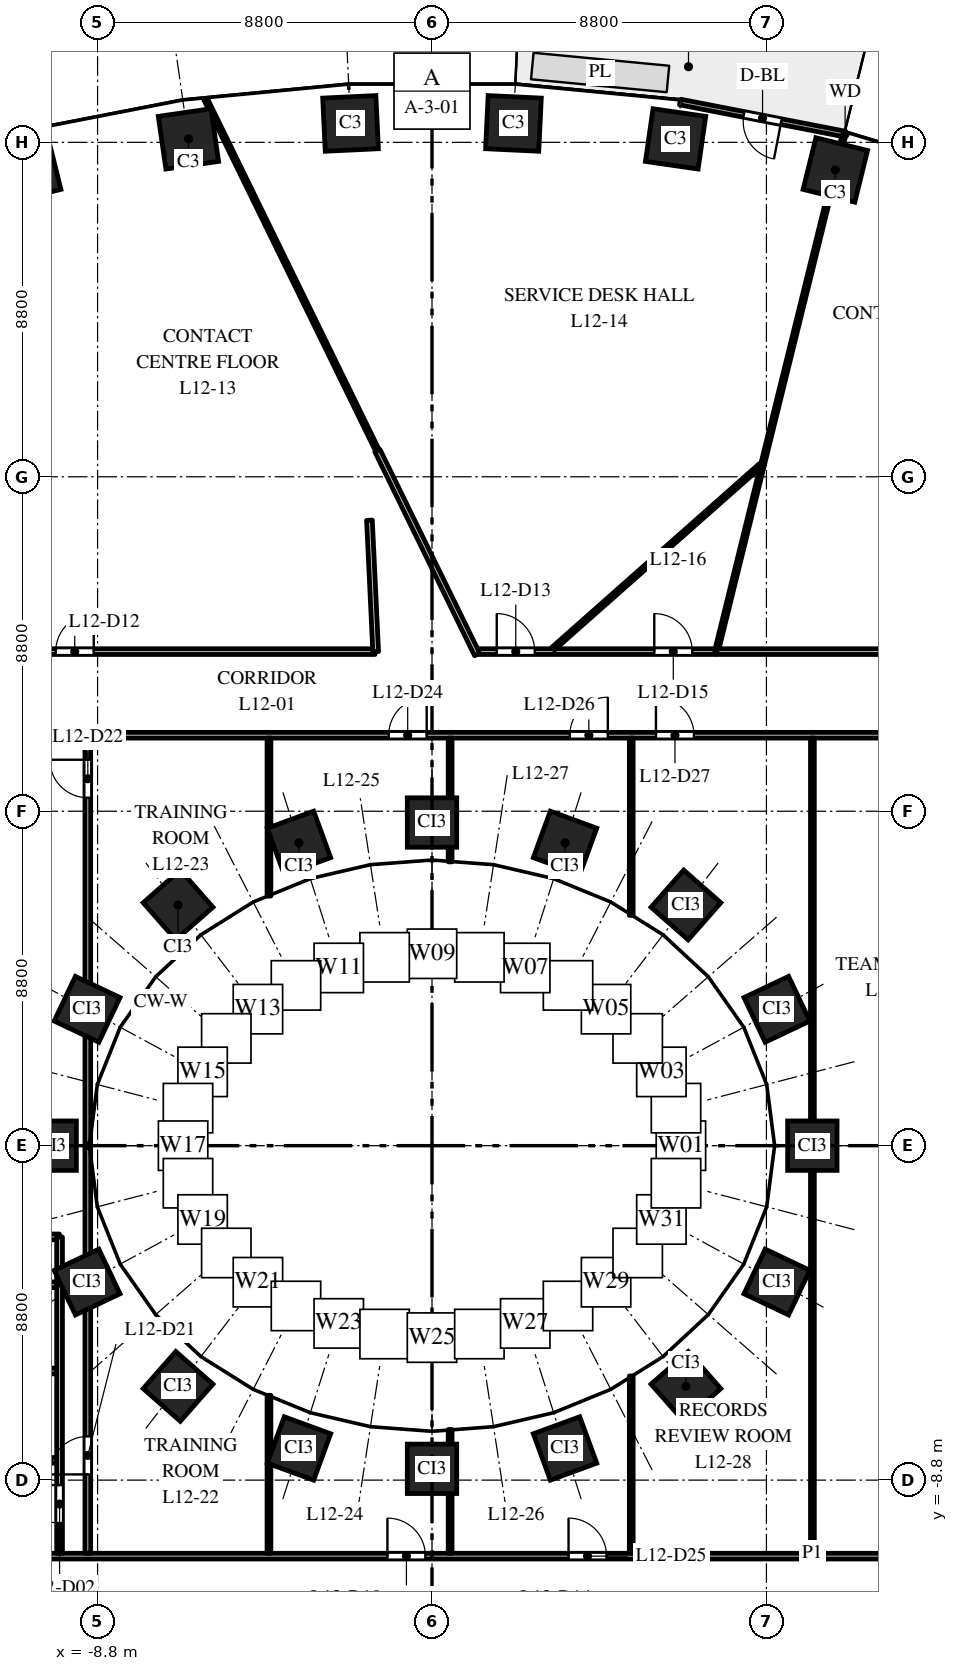
"""IFC4 building model, lengths in metres.
Left out: names, types, materials, properties, quantities, classifications, styles, units other than length and angle.
Written with IfcOpenShell. Run it as: python <this file> out.ifc"""

import sys

from ifc_helpers import new_model, si_unit, direction, frame, frame_2d, origin, origin_2d, place, context, subcontext, project, spatial, rectangle, extrude, element, fill, save


model = new_model("IFC4")
c1 = context("Model", 3, precision=1e-05, world=origin(), true_north=direction((0.0, 1.0)))
c2 = subcontext(c1, "Body", "Model", "MODEL_VIEW")
j1 = project(units=[si_unit("LENGTHUNIT", "METRE"), si_unit("PLANEANGLEUNIT", "RADIAN")], contexts=[c1])
p1 = place(None, origin())
s1 = spatial("IfcSite", under=j1, at=p1, CompositionType="ELEMENT")
p2 = place(p1, origin())
s2 = spatial("IfcBuilding", under=s1, at=p2, CompositionType="ELEMENT")
p3 = place(p2, frame((0.0, 0.0, 58.5)))
s3 = spatial("IfcBuildingStorey", under=s2, at=p3, CompositionType="ELEMENT", Elevation=58.5)
for number, where, z_axis, x_axis in (
    (1, (10.613, 25.674, 0.0), (0.0, 0.0, 1.0), (-0.971, 0.24, 0.0)),
    (2, (6.409, 26.491, 0.0), (0.0, 0.0, 1.0), (-0.99, 0.143, 0.0)),
    (3, (2.143, 26.898, 0.0), (0.0, 0.0, 1.0), (-0.999, 0.048, 0.0)),
    (4, (-2.143, 26.898, 0.0), (0.0, 0.0, 1.0), (-0.999, -0.048, 0.0)),
    (5, (-6.409, 26.491, 0.0), (0.0, 0.0, 1.0), (-0.99, -0.143, 0.0)),
    (6, (-10.613, 25.674, 0.0), (0.0, 0.0, 1.0), (-0.971, -0.24, 0.0)),
):
    element("IfcColumn", number, at=place(p3, frame(where, z_axis=z_axis, x_axis=x_axis)), inside=s3, PredefinedType="COLUMN", context=c2, shape_type="SweptSolid", body=[
        extrude(rectangle(XDim=1.4, YDim=1.4, at=origin_2d()), origin(), (0.0, 0.0, 1.0), 4.0),
    ])
for number, where, z_axis, x_axis in (
    (7, (10.008, 0.0, 0.0), (0.0, 0.0, 1.0), (0.0, 1.0, 0.0)),
    (8, (9.076, 3.588, 0.0), (0.0, 0.0, 1.0), (-0.429, 0.903, 0.0)),
    (9, (6.682, 6.334, 0.0), (0.0, 0.0, 1.0), (-0.751, 0.66, 0.0)),
    (10, (3.501, 7.967, 0.0), (0.0, 0.0, 1.0), (-0.939, 0.344, 0.0)),
    (11, (0.0, 8.503, 0.0), (0.0, 0.0, 1.0), (-1.0, 0.0, 0.0)),
    (12, (-3.501, 7.967, 0.0), (0.0, 0.0, 1.0), (-0.939, -0.344, 0.0)),
    (13, (-6.682, 6.334, 0.0), (0.0, 0.0, 1.0), (-0.751, -0.66, 0.0)),
    (14, (-9.076, 3.588, 0.0), (0.0, 0.0, 1.0), (-0.429, -0.903, 0.0)),
    (15, (-10.008, 0.0, 0.0), (0.0, 0.0, 1.0), (0.0, -1.0, 0.0)),
    (16, (-9.076, -3.588, 0.0), (0.0, 0.0, 1.0), (0.429, -0.903, 0.0)),
    (17, (-6.682, -6.334, 0.0), (0.0, 0.0, 1.0), (0.751, -0.66, 0.0)),
    (18, (-3.501, -7.967, 0.0), (0.0, 0.0, 1.0), (0.939, -0.344, 0.0)),
    (19, (0.0, -8.503, 0.0), (0.0, 0.0, 1.0), (1.0, 0.0, 0.0)),
    (20, (3.501, -7.967, 0.0), (0.0, 0.0, 1.0), (0.939, 0.344, 0.0)),
    (21, (6.682, -6.334, 0.0), (0.0, 0.0, 1.0), (0.751, 0.66, 0.0)),
    (22, (9.076, -3.588, 0.0), (0.0, 0.0, 1.0), (0.429, 0.903, 0.0)),
):
    element("IfcColumn", number, at=place(p3, frame(where, z_axis=z_axis, x_axis=x_axis)), inside=s3, PredefinedType="COLUMN", context=c2, shape_type="SweptSolid", body=[
        extrude(rectangle(XDim=1.3, YDim=1.3, at=origin_2d()), origin(), (0.0, 0.0, 1.0), 4.0),
    ])
p4 = place(p3, frame((10.871, 26.617, 0.0), z_axis=(0.0, 0.0, 1.0), x_axis=(-0.981631174778, 0.190788460615, 0.0)))
e23 = element("IfcWall", 23, at=p4, inside=s3, PredefinedType="STANDARD", context=c2, shape_type="SweptSolid", body=[
    extrude(rectangle(XDim=4.426, YDim=0.15, at=frame_2d((2.213, 0.0))), origin(), (0.0, 0.0, 1.0), 3.7),
])
p5 = place(p4, frame((1.713, 0.0, 0.0)))
e24 = element("IfcOpeningElement", 24, at=p5, cuts=e23, PredefinedType="OPENING", context=c2, shape_type="SweptSolid", body=[
    extrude(rectangle(XDim=1.0, YDim=2.4, at=frame_2d((0.5, 1.2))), frame((0.0, 0.085, 0.0), z_axis=(0.0, -1.0, 0.0), x_axis=(1.0, 0.0, 0.0)), (0.0, 0.0, 1.0), 0.17),
])
p6 = place(p3, frame((-14.3, -10.8, 0.0), z_axis=(0.0, 0.0, 1.0), x_axis=(1.0, 0.0, 0.0)))
e25 = element("IfcWall", 25, at=p6, inside=s3, PredefinedType="PARTITIONING", context=c2, shape_type="SweptSolid", body=[
    extrude(rectangle(XDim=28.6, YDim=0.15, at=frame_2d((14.3, 0.0))), origin(), (0.0, 0.0, 1.0), 2.85),
])
p7 = place(p6, frame((13.127, 0.0, 0.0)))
e26 = element("IfcOpeningElement", 26, at=p7, cuts=e25, PredefinedType="OPENING", context=c2, shape_type="SweptSolid", body=[
    extrude(rectangle(XDim=1.0, YDim=2.1, at=frame_2d((0.5, 1.05))), frame((0.0, 0.085, 0.0), z_axis=(0.0, -1.0, 0.0), x_axis=(1.0, 0.0, 0.0)), (0.0, 0.0, 1.0), 0.17),
])
p8 = place(p6, frame((17.893, 0.0, 0.0)))
e27 = element("IfcOpeningElement", 27, at=p8, cuts=e25, PredefinedType="OPENING", context=c2, shape_type="SweptSolid", body=[
    extrude(rectangle(XDim=1.0, YDim=2.1, at=frame_2d((0.5, 1.05))), frame((0.0, 0.085, 0.0), z_axis=(0.0, -1.0, 0.0), x_axis=(1.0, 0.0, 0.0)), (0.0, 0.0, 1.0), 0.17),
])
p9 = place(p3, frame((-14.3, 10.8, 0.0), z_axis=(0.0, 0.0, 1.0), x_axis=(1.0, 0.0, 0.0)))
e28 = element("IfcWall", 28, at=p9, inside=s3, PredefinedType="PARTITIONING", context=c2, shape_type="SweptSolid", body=[
    extrude(rectangle(XDim=28.6, YDim=0.15, at=frame_2d((14.3, 0.0))), origin(), (0.0, 0.0, 1.0), 2.85),
])
p10 = place(p9, frame((13.16, 0.0, 0.0)))
e29 = element("IfcOpeningElement", 29, at=p10, cuts=e28, PredefinedType="OPENING", context=c2, shape_type="SweptSolid", body=[
    extrude(rectangle(XDim=1.0, YDim=2.1, at=frame_2d((0.5, 1.05))), frame((0.0, 0.085, 0.0), z_axis=(0.0, -1.0, 0.0), x_axis=(1.0, 0.0, 0.0)), (0.0, 0.0, 1.0), 0.17),
])
p11 = place(p9, frame((17.927, 0.0, 0.0)))
e30 = element("IfcOpeningElement", 30, at=p11, cuts=e28, PredefinedType="OPENING", context=c2, shape_type="SweptSolid", body=[
    extrude(rectangle(XDim=1.0, YDim=2.1, at=frame_2d((0.5, 1.05))), frame((0.0, 0.085, 0.0), z_axis=(0.0, -1.0, 0.0), x_axis=(1.0, 0.0, 0.0)), (0.0, 0.0, 1.0), 0.17),
])
p12 = place(p9, frame((20.193, 0.0, 0.0)))
e31 = element("IfcOpeningElement", 31, at=p12, cuts=e28, PredefinedType="OPENING", context=c2, shape_type="SweptSolid", body=[
    extrude(rectangle(XDim=1.0, YDim=2.1, at=frame_2d((0.5, 1.05))), frame((0.0, 0.085, 0.0), z_axis=(0.0, -1.0, 0.0), x_axis=(1.0, 0.0, 0.0)), (0.0, 0.0, 1.0), 0.17),
])
p13 = place(p3, frame((-12.325, -8.28, 0.0), z_axis=(0.0, 0.0, 1.0), x_axis=(1.0, 0.0, 0.0)))
e32 = element("IfcWall", 32, at=p13, inside=s3, PredefinedType="PARTITIONING", context=c2, shape_type="SweptSolid", body=[
    extrude(rectangle(XDim=2.45, YDim=0.15, at=frame_2d((1.225, 0.0))), origin(), (0.0, 0.0, 1.0), 2.75),
])
p14 = place(p3, frame((-12.325, -5.928, 0.0), z_axis=(0.0, 0.0, 1.0), x_axis=(1.0, 0.0, 0.0)))
e33 = element("IfcWall", 33, at=p14, inside=s3, PredefinedType="PARTITIONING", context=c2, shape_type="SweptSolid", body=[
    extrude(rectangle(XDim=2.45, YDim=0.15, at=frame_2d((1.225, 0.0))), origin(), (0.0, 0.0, 1.0), 3.7),
])
p15 = place(p3, frame((-12.4, -3.66, 0.0), z_axis=(0.0, 0.0, 1.0), x_axis=(1.0, 0.0, 0.0)))
e34 = element("IfcWall", 34, at=p15, inside=s3, PredefinedType="PARTITIONING", context=c2, shape_type="SweptSolid", body=[
    extrude(rectangle(XDim=2.6, YDim=0.15, at=frame_2d((1.3, 0.0))), origin(), (0.0, 0.0, 1.0), 3.7),
])
p16 = place(p3, frame((-12.4, -2.4, 0.0), z_axis=(0.0, 0.0, 1.0), x_axis=(1.0, 0.0, 0.0)))
e35 = element("IfcWall", 35, at=p16, inside=s3, PredefinedType="PARTITIONING", context=c2, shape_type="SweptSolid", body=[
    extrude(rectangle(XDim=2.596, YDim=0.15, at=frame_2d((1.298, 0.0))), origin(), (0.0, 0.0, 1.0), 3.7),
])
p17 = place(p3, frame((-10.542, 13.0, 0.0), z_axis=(0.0, 0.0, 1.0), x_axis=(1.0, 0.0, 0.0)))
e36 = element("IfcWall", 36, at=p17, inside=s3, PredefinedType="PARTITIONING", context=c2, shape_type="SweptSolid", body=[
    extrude(rectangle(XDim=9.041, YDim=0.15, at=frame_2d((4.521, 0.0))), origin(), (0.0, 0.0, 1.0), 2.85),
])
p18 = place(p17, frame((0.641, 0.0, 0.0)))
e37 = element("IfcOpeningElement", 37, at=p18, cuts=e36, PredefinedType="OPENING", context=c2, shape_type="SweptSolid", body=[
    extrude(rectangle(XDim=1.0, YDim=2.1, at=frame_2d((0.5, 1.05))), frame((0.0, 0.085, 0.0), z_axis=(0.0, -1.0, 0.0), x_axis=(1.0, 0.0, 0.0)), (0.0, 0.0, 1.0), 0.17),
])
p19 = place(p3, frame((-9.8, -10.725, 0.0), z_axis=(0.0, 0.0, 1.0), x_axis=(0.0, 1.0, 0.0)))
e38 = element("IfcWall", 38, at=p19, inside=s3, PredefinedType="PARTITIONING", context=c2, shape_type="SweptSolid", body=[
    extrude(rectangle(XDim=7.065, YDim=0.15, at=frame_2d((3.533, 0.0))), origin(), (0.0, 0.0, 1.0), 2.75),
])
p20 = place(p19, frame((0.795, 0.0, 0.0)))
e39 = element("IfcOpeningElement", 39, at=p20, cuts=e38, PredefinedType="OPENING", context=c2, shape_type="SweptSolid", body=[
    extrude(rectangle(XDim=1.0, YDim=2.1, at=frame_2d((0.5, 1.05))), frame((0.0, 0.085, 0.0), z_axis=(0.0, -1.0, 0.0), x_axis=(1.0, 0.0, 0.0)), (0.0, 0.0, 1.0), 0.17),
])
p21 = place(p3, frame((-9.8, -3.66, 0.0), z_axis=(0.0, 0.0, 1.0), x_axis=(0.0, 1.0, 0.0)))
e40 = element("IfcWall", 40, at=p21, inside=s3, PredefinedType="PARTITIONING", context=c2, shape_type="SweptSolid", body=[
    extrude(rectangle(XDim=1.256, YDim=0.15, at=frame_2d((0.628, 0.0))), origin(), (0.0, 0.0, 1.0), 3.7),
])
p22 = place(p3, frame((-9.057, -10.725, 0.0), z_axis=(0.0, 0.0, 1.0), x_axis=(0.0, 1.0, 0.0)))
e41 = element("IfcWall", 41, at=p22, inside=s3, PredefinedType="PARTITIONING", context=c2, shape_type="SweptSolid", body=[
    extrude(rectangle(XDim=10.68, YDim=0.15, at=frame_2d((5.34, 0.0))), origin(), (0.0, 0.0, 1.0), 2.75),
])
p23 = place(p22, frame((2.075, 0.0, 0.0)))
e42 = element("IfcOpeningElement", 42, at=p23, cuts=e41, PredefinedType="OPENING", context=c2, shape_type="SweptSolid", body=[
    extrude(rectangle(XDim=1.0, YDim=2.1, at=frame_2d((0.5, 1.05))), frame((0.0, 0.085, 0.0), z_axis=(0.0, -1.0, 0.0), x_axis=(1.0, 0.0, 0.0)), (0.0, 0.0, 1.0), 0.17),
])
p24 = place(p3, frame((-9.057, 0.045, 0.0), z_axis=(0.0, 0.0, 1.0), x_axis=(0.0, 1.0, 0.0)))
e43 = element("IfcWall", 43, at=p24, inside=s3, PredefinedType="PARTITIONING", context=c2, shape_type="SweptSolid", body=[
    extrude(rectangle(XDim=10.68, YDim=0.15, at=frame_2d((5.34, 0.0))), origin(), (0.0, 0.0, 1.0), 2.75),
])
p25 = place(p24, frame((9.11, 0.0, 0.0)))
e44 = element("IfcOpeningElement", 44, at=p25, cuts=e43, PredefinedType="OPENING", context=c2, shape_type="SweptSolid", body=[
    extrude(rectangle(XDim=1.0, YDim=2.1, at=frame_2d((0.5, 1.05))), frame((0.0, 0.085, 0.0), z_axis=(0.0, -1.0, 0.0), x_axis=(1.0, 0.0, 0.0)), (0.0, 0.0, 1.0), 0.17),
])
p26 = place(p3, frame((-5.958, 27.538, 0.0), z_axis=(0.0, 0.0, 1.0), x_axis=(0.439258205704, -0.898360856628, 0.0)))
e45 = element("IfcWall", 45, at=p26, inside=s3, PredefinedType="PARTITIONING", context=c2, shape_type="SweptSolid", body=[
    extrude(rectangle(XDim=10.384, YDim=0.1, at=frame_2d((5.192, 0.0))), origin(), (0.0, 0.0, 1.0), 2.85),
])
for number, where, z_axis, x_axis in (
    (46, (-4.29, -10.725, 0.0), (0.0, 0.0, 1.0), (0.0, 1.0, 0.0)),
    (47, (-4.29, 6.568, 0.0), (0.0, 0.0, 1.0), (0.0, 1.0, 0.0)),
):
    element("IfcWall", number, at=place(p3, frame(where, z_axis=z_axis, x_axis=x_axis)), inside=s3, PredefinedType="PARTITIONING", context=c2, shape_type="SweptSolid", body=[
        extrude(rectangle(XDim=4.157, YDim=0.1, at=frame_2d((2.079, 0.0))), origin(), (0.0, 0.0, 1.0), 2.85),
    ])
p27 = place(p3, frame((-1.646, 16.456, 0.0), z_axis=(0.0, 0.0, 1.0), x_axis=(0.047417639272, -0.9988751511, 0.0)))
e48 = element("IfcWall", 48, at=p27, inside=s3, PredefinedType="PARTITIONING", context=c2, shape_type="SweptSolid", body=[
    extrude(rectangle(XDim=3.46, YDim=0.15, at=frame_2d((1.73, 0.0))), origin(), (0.0, 0.0, 1.0), 3.7),
])
p28 = place(p3, frame((-1.437, 18.29, 0.0), z_axis=(0.0, 0.0, 1.0), x_axis=(0.439496028197, -0.898244533075, 0.0)))
e49 = element("IfcWall", 49, at=p28, inside=s3, PredefinedType="PARTITIONING", context=c2, shape_type="SweptSolid", body=[
    extrude(rectangle(XDim=5.973, YDim=0.15, at=frame_2d((2.986, 0.0))), origin(), (0.0, 0.0, 1.0), 2.85),
])
for number, where, z_axis, x_axis in (
    (50, (0.477, -10.725, 0.0), (0.0, 0.0, 1.0), (0.0, 1.0, 0.0)),
    (51, (0.477, 7.468, 0.0), (0.0, 0.0, 1.0), (0.0, 1.0, 0.0)),
):
    element("IfcWall", number, at=place(p3, frame(where, z_axis=z_axis, x_axis=x_axis)), inside=s3, PredefinedType="PARTITIONING", context=c2, shape_type="SweptSolid", body=[
        extrude(rectangle(XDim=3.257, YDim=0.1, at=frame_2d((1.628, 0.0))), origin(), (0.0, 0.0, 1.0), 2.85),
    ])
p29 = place(p3, frame((1.233, 13.0, 0.0), z_axis=(0.0, 0.0, 1.0), x_axis=(1.0, 0.0, 0.0)))
e52 = element("IfcWall", 52, at=p29, inside=s3, PredefinedType="PARTITIONING", context=c2, shape_type="SweptSolid", body=[
    extrude(rectangle(XDim=6.25, YDim=0.15, at=frame_2d((3.125, 0.0))), origin(), (0.0, 0.0, 1.0), 2.85),
])
p30 = place(p29, frame((0.471, 0.0, 0.0)))
e53 = element("IfcOpeningElement", 53, at=p30, cuts=e52, PredefinedType="OPENING", context=c2, shape_type="SweptSolid", body=[
    extrude(rectangle(XDim=1.0, YDim=2.1, at=frame_2d((0.5, 1.05))), frame((0.0, 0.085, 0.0), z_axis=(0.0, -1.0, 0.0), x_axis=(1.0, 0.0, 0.0)), (0.0, 0.0, 1.0), 0.17),
])
p31 = place(p29, frame((4.616, 0.0, 0.0)))
e54 = element("IfcOpeningElement", 54, at=p31, cuts=e52, PredefinedType="OPENING", context=c2, shape_type="SweptSolid", body=[
    extrude(rectangle(XDim=1.0, YDim=2.1, at=frame_2d((0.5, 1.05))), frame((0.0, 0.085, 0.0), z_axis=(0.0, -1.0, 0.0), x_axis=(1.0, 0.0, 0.0)), (0.0, 0.0, 1.0), 0.17),
])
p32 = place(p3, frame((3.187, 13.078, 0.0), z_axis=(0.0, 0.0, 1.0), x_axis=(0.749027274438, 0.662539162728, 0.0)))
e55 = element("IfcWall", 55, at=p32, inside=s3, PredefinedType="PARTITIONING", context=c2, shape_type="SweptSolid", body=[
    extrude(rectangle(XDim=7.283, YDim=0.1, at=frame_2d((3.642, 0.0))), origin(), (0.0, 0.0, 1.0), 2.85),
])
for number, where, z_axis, x_axis in (
    (56, (5.243, -10.725, 0.0), (0.0, 0.0, 1.0), (0.0, 1.0, 0.0)),
    (57, (5.243, 6.059, 0.0), (0.0, 0.0, 1.0), (0.0, 1.0, 0.0)),
):
    element("IfcWall", number, at=place(p3, frame(where, z_axis=z_axis, x_axis=x_axis)), inside=s3, PredefinedType="PARTITIONING", context=c2, shape_type="SweptSolid", body=[
        extrude(rectangle(XDim=4.666, YDim=0.1, at=frame_2d((2.333, 0.0))), origin(), (0.0, 0.0, 1.0), 2.85),
    ])
p33 = place(p3, frame((7.483, 13.0, 0.0), z_axis=(0.0, 0.0, 1.0), x_axis=(0.239763745499, 0.97083126564, 0.0)))
e58 = element("IfcWall", 58, at=p33, inside=s3, PredefinedType="PARTITIONING", context=c2, shape_type="SweptSolid", body=[
    extrude(rectangle(XDim=14.056, YDim=0.1, at=frame_2d((7.028, 0.0))), origin(), (0.0, 0.0, 1.0), 2.85),
])
p34 = place(p3, frame((7.499, 13.0, 0.0), z_axis=(0.0, 0.0, 1.0), x_axis=(1.0, 0.0, 0.0)))
e59 = element("IfcWall", 59, at=p34, inside=s3, PredefinedType="PARTITIONING", context=c2, shape_type="SweptSolid", body=[
    extrude(rectangle(XDim=9.001, YDim=0.15, at=frame_2d((4.5, 0.0))), origin(), (0.0, 0.0, 1.0), 2.85),
])
p35 = place(p34, frame((7.351, 0.0, 0.0)))
e60 = element("IfcOpeningElement", 60, at=p35, cuts=e59, PredefinedType="OPENING", context=c2, shape_type="SweptSolid", body=[
    extrude(rectangle(XDim=1.0, YDim=2.1, at=frame_2d((0.5, 1.05))), frame((0.0, 0.085, 0.0), z_axis=(0.0, -1.0, 0.0), x_axis=(1.0, 0.0, 0.0)), (0.0, 0.0, 1.0), 0.17),
])
p36 = place(p3, frame((10.01, -10.725, 0.0), z_axis=(0.0, 0.0, 1.0), x_axis=(0.0, 1.0, 0.0)))
e61 = element("IfcWall", 61, at=p36, inside=s3, PredefinedType="PARTITIONING", context=c2, shape_type="SweptSolid", body=[
    extrude(rectangle(XDim=21.45, YDim=0.1, at=frame_2d((10.725, 0.0))), origin(), (0.0, 0.0, 1.0), 2.75),
])
p37 = place(p5, origin())
e62 = element("IfcDoor", 62, at=p37, inside=s3, OperationType="SINGLE_SWING_LEFT", PredefinedType="DOOR", context=c2, shape_type="SweptSolid", body=[
    extrude(rectangle(XDim=1.0, YDim=2.4, at=frame_2d((0.5, 1.2))), frame((0.0, 0.025, 0.0), z_axis=(0.0, -1.0, 0.0), x_axis=(1.0, 0.0, 0.0)), (0.0, 0.0, 1.0), 0.05),
])
fill(e24, e62)
p38 = place(p20, origin())
e63 = element("IfcDoor", 63, at=p38, inside=s3, OperationType="SINGLE_SWING_RIGHT", PredefinedType="DOOR", context=c2, shape_type="SweptSolid", body=[
    extrude(rectangle(XDim=1.0, YDim=2.1, at=frame_2d((0.5, 1.05))), frame((0.0, 0.025, 0.0), z_axis=(0.0, -1.0, 0.0), x_axis=(1.0, 0.0, 0.0)), (0.0, 0.0, 1.0), 0.05),
])
fill(e39, e63)
p39 = place(p18, origin())
e64 = element("IfcDoor", 64, at=p39, inside=s3, OperationType="SINGLE_SWING_RIGHT", PredefinedType="DOOR", context=c2, shape_type="SweptSolid", body=[
    extrude(rectangle(XDim=1.0, YDim=2.1, at=frame_2d((0.5, 1.05))), frame((0.0, 0.025, 0.0), z_axis=(0.0, -1.0, 0.0), x_axis=(1.0, 0.0, 0.0)), (0.0, 0.0, 1.0), 0.05),
])
fill(e37, e64)
p40 = place(p30, origin())
e65 = element("IfcDoor", 65, at=p40, inside=s3, OperationType="SINGLE_SWING_LEFT", PredefinedType="DOOR", context=c2, shape_type="SweptSolid", body=[
    extrude(rectangle(XDim=1.0, YDim=2.1, at=frame_2d((0.5, 1.05))), frame((0.0, 0.025, 0.0), z_axis=(0.0, -1.0, 0.0), x_axis=(1.0, 0.0, 0.0)), (0.0, 0.0, 1.0), 0.05),
])
fill(e53, e65)
p41 = place(p31, origin())
e66 = element("IfcDoor", 66, at=p41, inside=s3, OperationType="SINGLE_SWING_LEFT", PredefinedType="DOOR", context=c2, shape_type="SweptSolid", body=[
    extrude(rectangle(XDim=1.0, YDim=2.1, at=frame_2d((0.5, 1.05))), frame((0.0, 0.025, 0.0), z_axis=(0.0, -1.0, 0.0), x_axis=(1.0, 0.0, 0.0)), (0.0, 0.0, 1.0), 0.05),
])
fill(e54, e66)
p42 = place(p23, origin())
e67 = element("IfcDoor", 67, at=p42, inside=s3, OperationType="SINGLE_SWING_LEFT", PredefinedType="DOOR", context=c2, shape_type="SweptSolid", body=[
    extrude(rectangle(XDim=1.0, YDim=2.1, at=frame_2d((0.5, 1.05))), frame((0.0, 0.025, 0.0), z_axis=(0.0, -1.0, 0.0), x_axis=(1.0, 0.0, 0.0)), (0.0, 0.0, 1.0), 0.05),
])
fill(e42, e67)
p43 = place(p25, origin())
e68 = element("IfcDoor", 68, at=p43, inside=s3, OperationType="SINGLE_SWING_RIGHT", PredefinedType="DOOR", context=c2, shape_type="SweptSolid", body=[
    extrude(rectangle(XDim=1.0, YDim=2.1, at=frame_2d((0.5, 1.05))), frame((0.0, 0.025, 0.0), z_axis=(0.0, -1.0, 0.0), x_axis=(1.0, 0.0, 0.0)), (0.0, 0.0, 1.0), 0.05),
])
fill(e44, e68)
p44 = place(p7, origin())
e69 = element("IfcDoor", 69, at=p44, inside=s3, OperationType="SINGLE_SWING_LEFT", PredefinedType="DOOR", context=c2, shape_type="SweptSolid", body=[
    extrude(rectangle(XDim=1.0, YDim=2.1, at=frame_2d((0.5, 1.05))), frame((0.0, 0.025, 0.0), z_axis=(0.0, -1.0, 0.0), x_axis=(1.0, 0.0, 0.0)), (0.0, 0.0, 1.0), 0.05),
])
fill(e26, e69)
p45 = place(p10, origin())
e70 = element("IfcDoor", 70, at=p45, inside=s3, OperationType="SINGLE_SWING_RIGHT", PredefinedType="DOOR", context=c2, shape_type="SweptSolid", body=[
    extrude(rectangle(XDim=1.0, YDim=2.1, at=frame_2d((0.5, 1.05))), frame((0.0, 0.025, 0.0), z_axis=(0.0, -1.0, 0.0), x_axis=(1.0, 0.0, 0.0)), (0.0, 0.0, 1.0), 0.05),
])
fill(e29, e70)
p46 = place(p8, origin())
e71 = element("IfcDoor", 71, at=p46, inside=s3, OperationType="SINGLE_SWING_LEFT", PredefinedType="DOOR", context=c2, shape_type="SweptSolid", body=[
    extrude(rectangle(XDim=1.0, YDim=2.1, at=frame_2d((0.5, 1.05))), frame((0.0, 0.025, 0.0), z_axis=(0.0, -1.0, 0.0), x_axis=(1.0, 0.0, 0.0)), (0.0, 0.0, 1.0), 0.05),
])
fill(e27, e71)
p47 = place(p11, origin())
e72 = element("IfcDoor", 72, at=p47, inside=s3, OperationType="SINGLE_SWING_RIGHT", PredefinedType="DOOR", context=c2, shape_type="SweptSolid", body=[
    extrude(rectangle(XDim=1.0, YDim=2.1, at=frame_2d((0.5, 1.05))), frame((0.0, 0.025, 0.0), z_axis=(0.0, -1.0, 0.0), x_axis=(1.0, 0.0, 0.0)), (0.0, 0.0, 1.0), 0.05),
])
fill(e30, e72)
p48 = place(p12, origin())
e73 = element("IfcDoor", 73, at=p48, inside=s3, OperationType="SINGLE_SWING_LEFT", PredefinedType="DOOR", context=c2, shape_type="SweptSolid", body=[
    extrude(rectangle(XDim=1.0, YDim=2.1, at=frame_2d((0.5, 1.05))), frame((0.0, 0.025, 0.0), z_axis=(0.0, -1.0, 0.0), x_axis=(1.0, 0.0, 0.0)), (0.0, 0.0, 1.0), 0.05),
])
fill(e31, e73)
save(model, sys.argv[1])
